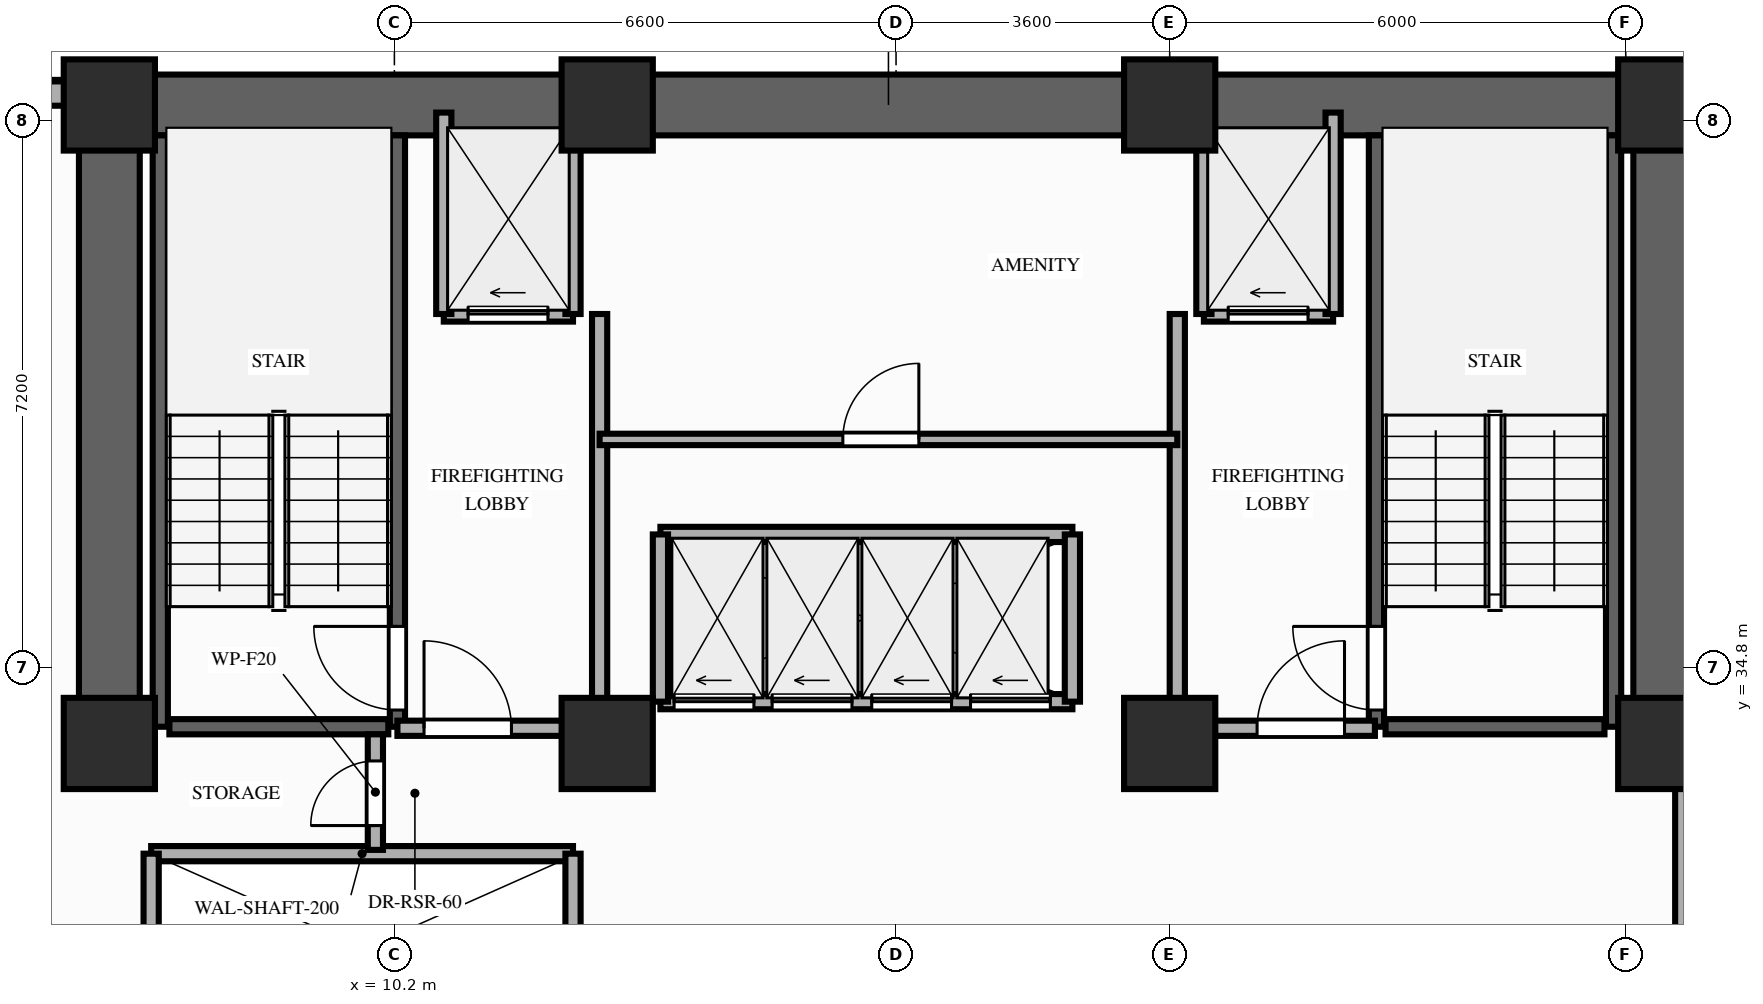
"""IFC4 building model, lengths in metres.
Left out: names, types, materials, properties, quantities, classifications, styles, units other than length and angle.
Written with IfcOpenShell. Run it as: python <this file> out.ifc"""

import sys

from ifc_helpers import new_model, si_unit, direction, frame, frame_2d, origin, origin_2d, place, context, subcontext, project, spatial, rectangle, extrude, element, fill, save


model = new_model("IFC4")
c1 = context("Model", 3, precision=1e-05, world=origin(), true_north=direction((0.0, 1.0)))
c2 = subcontext(c1, "Body", "Model", "MODEL_VIEW")
j1 = project(units=[si_unit("LENGTHUNIT", "METRE"), si_unit("PLANEANGLEUNIT", "RADIAN")], contexts=[c1])
p1 = place(None, origin())
s1 = spatial("IfcSite", under=j1, at=p1, CompositionType="ELEMENT")
p2 = place(p1, origin())
s2 = spatial("IfcBuilding", under=s1, at=p2, CompositionType="ELEMENT")
p3 = place(p2, frame((0.0, 0.0, 86.6)))
s3 = spatial("IfcBuildingStorey", under=s2, at=p3, CompositionType="ELEMENT", Elevation=86.6)
for number, where, z_axis, x_axis in (
    (1, (6.45, 33.8, 0.0), (0.0, 0.0, 1.0), (1.0, 0.0, 0.0)),
    (2, (13.0, 33.8, 0.0), (0.0, 0.0, 1.0), (1.0, 0.0, 0.0)),
    (3, (20.4, 33.8, 0.0), (0.0, 0.0, 1.0), (1.0, 0.0, 0.0)),
    (4, (26.9, 33.8, 0.0), (0.0, 0.0, 1.0), (1.0, 0.0, 0.0)),
    (5, (6.45, 42.2, 0.0), (0.0, 0.0, 1.0), (1.0, 0.0, 0.0)),
    (6, (13.0, 42.2, 0.0), (0.0, 0.0, 1.0), (1.0, 0.0, 0.0)),
    (7, (20.4, 42.2, 0.0), (0.0, 0.0, 1.0), (1.0, 0.0, 0.0)),
    (8, (26.9, 42.2, 0.0), (0.0, 0.0, 1.0), (1.0, 0.0, 0.0)),
):
    element("IfcColumn", number, at=place(p3, frame(where, z_axis=z_axis, x_axis=x_axis)), inside=s3, PredefinedType="COLUMN", context=c2, shape_type="SweptSolid", body=[
        extrude(rectangle(XDim=1.2, YDim=1.2, at=origin_2d()), origin(), (0.0, 0.0, 1.0), 3.2),
    ])
p4 = place(p3, frame((6.0, 42.35, 0.0), z_axis=(0.0, 0.0, 1.0), x_axis=(-1.0, 0.0, 0.0)))
e9 = element("IfcWall", 9, at=p4, inside=s3, PredefinedType="STANDARD", context=c2, shape_type="SweptSolid", body=[
    extrude(rectangle(XDim=2.0, YDim=0.32, at=frame_2d((1.0, 0.0))), origin(), (0.0, 0.0, 1.0), 3.02),
])
p5 = place(p3, frame((6.45, 42.2, 0.0), z_axis=(0.0, 0.0, 1.0), x_axis=(1.0, 0.0, 0.0)))
e10 = element("IfcWall", 10, at=p5, inside=s3, PredefinedType="SHEAR", context=c2, shape_type="SweptSolid", body=[
    extrude(rectangle(XDim=20.45, YDim=0.8, at=frame_2d((10.225, 0.0))), origin(), (0.0, 0.0, 1.0), 3.02),
])
for number, where, z_axis, x_axis in (
    (11, (6.45, 33.8, 0.0), (0.0, 0.0, 1.0), (0.0, 1.0, 0.0)),
    (12, (26.9, 33.8, 0.0), (0.0, 0.0, 1.0), (0.0, 1.0, 0.0)),
):
    element("IfcWall", number, at=place(p3, frame(where, z_axis=z_axis, x_axis=x_axis)), inside=s3, PredefinedType="SHEAR", context=c2, shape_type="SweptSolid", body=[
        extrude(rectangle(XDim=7.95, YDim=0.8, at=frame_2d((3.975, 0.0))), origin(), (0.0, 0.0, 1.0), 3.02),
    ])
p6 = place(p3, frame((7.12, 34.02, 0.0), z_axis=(0.0, 0.0, 1.0), x_axis=(0.0, 1.0, 0.0)))
e13 = element("IfcWall", 13, at=p6, inside=s3, PredefinedType="SHEAR", context=c2, shape_type="SweptSolid", body=[
    extrude(rectangle(XDim=7.78, YDim=0.2, at=frame_2d((3.89, 0.0))), origin(), (0.0, 0.0, 1.0), 3.02),
])
p7 = place(p3, frame((10.24, 34.02, 0.0), z_axis=(0.0, 0.0, 1.0), x_axis=(0.0, 1.0, 0.0)))
e14 = element("IfcWall", 14, at=p7, inside=s3, PredefinedType="SHEAR", context=c2, shape_type="SweptSolid", body=[
    extrude(rectangle(XDim=7.78, YDim=0.2, at=frame_2d((3.89, 0.0))), origin(), (0.0, 0.0, 1.0), 3.02),
])
p8 = place(p7, frame((0.22, 0.0, 0.0)))
e15 = element("IfcOpeningElement", 15, at=p8, cuts=e14, PredefinedType="OPENING", context=c2, shape_type="SweptSolid", body=[
    extrude(rectangle(XDim=1.1, YDim=2.15, at=frame_2d((0.55, 1.075))), frame((0.0, 0.11, 0.0), z_axis=(0.0, -1.0, 0.0), x_axis=(1.0, 0.0, 0.0)), (0.0, 0.0, 1.0), 0.22),
])
p9 = place(p3, frame((7.24, 34.02, 0.0), z_axis=(0.0, 0.0, 1.0), x_axis=(1.0, 0.0, 0.0)))
e16 = element("IfcWall", 16, at=p9, inside=s3, PredefinedType="SHEAR", context=c2, shape_type="SweptSolid", body=[
    extrude(rectangle(XDim=2.88, YDim=0.2, at=frame_2d((1.44, 0.0))), origin(), (0.0, 0.0, 1.0), 3.02),
])
p10 = place(p3, frame((23.12, 34.02, 0.0), z_axis=(0.0, 0.0, 1.0), x_axis=(0.0, 1.0, 0.0)))
e17 = element("IfcWall", 17, at=p10, inside=s3, PredefinedType="SHEAR", context=c2, shape_type="SweptSolid", body=[
    extrude(rectangle(XDim=7.78, YDim=0.2, at=frame_2d((3.89, 0.0))), origin(), (0.0, 0.0, 1.0), 3.02),
])
p11 = place(p10, frame((0.22, 0.0, 0.0)))
e18 = element("IfcOpeningElement", 18, at=p11, cuts=e17, PredefinedType="OPENING", context=c2, shape_type="SweptSolid", body=[
    extrude(rectangle(XDim=1.1, YDim=2.15, at=frame_2d((0.55, 1.075))), frame((0.0, 0.11, 0.0), z_axis=(0.0, -1.0, 0.0), x_axis=(1.0, 0.0, 0.0)), (0.0, 0.0, 1.0), 0.22),
])
p12 = place(p3, frame((26.24, 34.02, 0.0), z_axis=(0.0, 0.0, 1.0), x_axis=(0.0, 1.0, 0.0)))
e19 = element("IfcWall", 19, at=p12, inside=s3, PredefinedType="SHEAR", context=c2, shape_type="SweptSolid", body=[
    extrude(rectangle(XDim=7.78, YDim=0.2, at=frame_2d((3.89, 0.0))), origin(), (0.0, 0.0, 1.0), 3.02),
])
p13 = place(p3, frame((23.24, 34.02, 0.0), z_axis=(0.0, 0.0, 1.0), x_axis=(1.0, 0.0, 0.0)))
e20 = element("IfcWall", 20, at=p13, inside=s3, PredefinedType="SHEAR", context=c2, shape_type="SweptSolid", body=[
    extrude(rectangle(XDim=2.88, YDim=0.2, at=frame_2d((1.44, 0.0))), origin(), (0.0, 0.0, 1.0), 3.02),
])
p14 = place(p3, frame((7.0, 32.35, 0.0), z_axis=(0.0, 0.0, 1.0), x_axis=(1.0, 0.0, 0.0)))
e21 = element("IfcWall", 21, at=p14, inside=s3, PredefinedType="MOVABLE", context=c2, shape_type="SweptSolid", body=[
    extrude(rectangle(XDim=5.55, YDim=0.2, at=frame_2d((2.775, 0.0))), origin(), (0.0, 0.0, 1.0), 3.02),
])
for number, where, z_axis, x_axis in (
    (22, (7.0, 29.85, 0.0), (0.0, 0.0, 1.0), (0.0, 1.0, 0.0)),
    (23, (12.55, 29.85, 0.0), (0.0, 0.0, 1.0), (0.0, 1.0, 0.0)),
):
    element("IfcWall", number, at=place(p3, frame(where, z_axis=z_axis, x_axis=x_axis)), inside=s3, PredefinedType="MOVABLE", context=c2, shape_type="SweptSolid", body=[
        extrude(rectangle(XDim=2.5, YDim=0.2, at=frame_2d((1.25, 0.0))), origin(), (0.0, 0.0, 1.0), 3.02),
    ])
p15 = place(p3, frame((10.85, 39.45, 0.0), z_axis=(0.0, 0.0, 1.0), x_axis=(1.0, 0.0, 0.0)))
e24 = element("IfcWall", 24, at=p15, inside=s3, PredefinedType="MOVABLE", context=c2, shape_type="SweptSolid", body=[
    extrude(rectangle(XDim=1.7, YDim=0.2, at=frame_2d((0.85, 0.0))), origin(), (0.0, 0.0, 1.0), 3.02),
])
p16 = place(p15, frame((0.32, 0.0, 0.0)))
e25 = element("IfcOpeningElement", 25, at=p16, cuts=e24, PredefinedType="OPENING", context=c2, shape_type="SweptSolid", body=[
    extrude(rectangle(XDim=1.05, YDim=2.15, at=frame_2d((0.525, 1.075))), frame((0.0, 0.11, 0.0), z_axis=(0.0, -1.0, 0.0), x_axis=(1.0, 0.0, 0.0)), (0.0, 0.0, 1.0), 0.22),
])
p17 = place(p3, frame((20.85, 39.45, 0.0), z_axis=(0.0, 0.0, 1.0), x_axis=(1.0, 0.0, 0.0)))
e26 = element("IfcWall", 26, at=p17, inside=s3, PredefinedType="MOVABLE", context=c2, shape_type="SweptSolid", body=[
    extrude(rectangle(XDim=1.7, YDim=0.2, at=frame_2d((0.85, 0.0))), origin(), (0.0, 0.0, 1.0), 3.02),
])
p18 = place(p17, frame((0.32, 0.0, 0.0)))
e27 = element("IfcOpeningElement", 27, at=p18, cuts=e26, PredefinedType="OPENING", context=c2, shape_type="SweptSolid", body=[
    extrude(rectangle(XDim=1.05, YDim=2.15, at=frame_2d((0.525, 1.075))), frame((0.0, 0.11, 0.0), z_axis=(0.0, -1.0, 0.0), x_axis=(1.0, 0.0, 0.0)), (0.0, 0.0, 1.0), 0.22),
])
for number, where, z_axis, x_axis in (
    (28, (10.85, 39.45, 0.0), (0.0, 0.0, 1.0), (0.0, 1.0, 0.0)),
    (29, (12.55, 39.45, 0.0), (0.0, 0.0, 1.0), (0.0, 1.0, 0.0)),
):
    element("IfcWall", number, at=place(p3, frame(where, z_axis=z_axis, x_axis=x_axis)), inside=s3, PredefinedType="MOVABLE", context=c2, shape_type="SweptSolid", body=[
        extrude(rectangle(XDim=2.65, YDim=0.2, at=frame_2d((1.325, 0.0))), origin(), (0.0, 0.0, 1.0), 2.4),
    ])
p19 = place(p3, frame((12.9, 34.0, 0.0), z_axis=(0.0, 0.0, 1.0), x_axis=(0.0, 1.0, 0.0)))
e30 = element("IfcWall", 30, at=p19, inside=s3, PredefinedType="PARTITIONING", context=c2, shape_type="SweptSolid", body=[
    extrude(rectangle(XDim=5.45, YDim=0.2, at=frame_2d((2.725, 0.0))), origin(), (0.0, 0.0, 1.0), 2.4),
])
p20 = place(p3, frame((10.24, 34.0, 0.0), z_axis=(0.0, 0.0, 1.0), x_axis=(1.0, 0.0, 0.0)))
e31 = element("IfcWall", 31, at=p20, inside=s3, PredefinedType="PARTITIONING", context=c2, shape_type="SweptSolid", body=[
    extrude(rectangle(XDim=2.66, YDim=0.2, at=frame_2d((1.33, 0.0))), origin(), (0.0, 0.0, 1.0), 2.4),
])
p21 = place(p20, frame((0.35, 0.0, 0.0)))
e32 = element("IfcOpeningElement", 32, at=p21, cuts=e31, PredefinedType="OPENING", context=c2, shape_type="SweptSolid", body=[
    extrude(rectangle(XDim=1.15, YDim=2.15, at=frame_2d((0.575, 1.075))), frame((0.0, 0.11, 0.0), z_axis=(0.0, -1.0, 0.0), x_axis=(1.0, 0.0, 0.0)), (0.0, 0.0, 1.0), 0.22),
])
for number, where, z_axis, x_axis in (
    (33, (20.85, 39.45, 0.0), (0.0, 0.0, 1.0), (0.0, 1.0, 0.0)),
    (34, (22.55, 39.45, 0.0), (0.0, 0.0, 1.0), (0.0, 1.0, 0.0)),
):
    element("IfcWall", number, at=place(p3, frame(where, z_axis=z_axis, x_axis=x_axis)), inside=s3, PredefinedType="MOVABLE", context=c2, shape_type="SweptSolid", body=[
        extrude(rectangle(XDim=2.65, YDim=0.2, at=frame_2d((1.325, 0.0))), origin(), (0.0, 0.0, 1.0), 2.4),
    ])
p22 = place(p3, frame((20.5, 34.0, 0.0), z_axis=(0.0, 0.0, 1.0), x_axis=(0.0, 1.0, 0.0)))
e35 = element("IfcWall", 35, at=p22, inside=s3, PredefinedType="PARTITIONING", context=c2, shape_type="SweptSolid", body=[
    extrude(rectangle(XDim=5.45, YDim=0.2, at=frame_2d((2.725, 0.0))), origin(), (0.0, 0.0, 1.0), 2.4),
])
p23 = place(p3, frame((20.5, 34.0, 0.0), z_axis=(0.0, 0.0, 1.0), x_axis=(1.0, 0.0, 0.0)))
e36 = element("IfcWall", 36, at=p23, inside=s3, PredefinedType="PARTITIONING", context=c2, shape_type="SweptSolid", body=[
    extrude(rectangle(XDim=2.6, YDim=0.2, at=frame_2d((1.3, 0.0))), origin(), (0.0, 0.0, 1.0), 2.4),
])
p24 = place(p23, frame((1.05, 0.0, 0.0)))
e37 = element("IfcOpeningElement", 37, at=p24, cuts=e36, PredefinedType="OPENING", context=c2, shape_type="SweptSolid", body=[
    extrude(rectangle(XDim=1.15, YDim=2.15, at=frame_2d((0.575, 1.075))), frame((0.0, 0.11, 0.0), z_axis=(0.0, -1.0, 0.0), x_axis=(1.0, 0.0, 0.0)), (0.0, 0.0, 1.0), 0.22),
])
p25 = place(p3, frame((9.95, 32.4, 0.0), z_axis=(0.0, 0.0, 1.0), x_axis=(0.0, 1.0, 0.0)))
e38 = element("IfcWall", 38, at=p25, inside=s3, PredefinedType="PARTITIONING", context=c2, shape_type="SweptSolid", body=[
    extrude(rectangle(XDim=1.52, YDim=0.2, at=frame_2d((0.76, 0.0))), origin(), (0.0, 0.0, 1.0), 2.4),
])
p26 = place(p25, frame((0.32, 0.0, 0.0)))
e39 = element("IfcOpeningElement", 39, at=p26, cuts=e38, PredefinedType="OPENING", context=c2, shape_type="SweptSolid", body=[
    extrude(rectangle(XDim=0.85, YDim=2.05, at=frame_2d((0.425, 1.025))), frame((0.0, 0.11, 0.0), z_axis=(0.0, -1.0, 0.0), x_axis=(1.0, 0.0, 0.0)), (0.0, 0.0, 1.0), 0.22),
])
p27 = place(p3, frame((12.9, 37.8, 0.0), z_axis=(0.0, 0.0, 1.0), x_axis=(1.0, 0.0, 0.0)))
e40 = element("IfcWall", 40, at=p27, inside=s3, PredefinedType="PARTITIONING", context=c2, shape_type="SweptSolid", body=[
    extrude(rectangle(XDim=7.6, YDim=0.15, at=frame_2d((3.8, 0.0))), origin(), (0.0, 0.0, 1.0), 3.02),
])
p28 = place(p27, frame((3.2, 0.0, 0.0)))
e41 = element("IfcOpeningElement", 41, at=p28, cuts=e40, PredefinedType="OPENING", context=c2, shape_type="SweptSolid", body=[
    extrude(rectangle(XDim=1.0, YDim=2.15, at=frame_2d((0.5, 1.075))), frame((0.0, 0.085, 0.0), z_axis=(0.0, -1.0, 0.0), x_axis=(1.0, 0.0, 0.0)), (0.0, 0.0, 1.0), 0.17),
])
p29 = place(p3, frame((13.7, 34.35, 0.0), z_axis=(0.0, 0.0, 1.0), x_axis=(1.0, 0.0, 0.0)))
e42 = element("IfcWall", 42, at=p29, inside=s3, PredefinedType="MOVABLE", context=c2, shape_type="SweptSolid", body=[
    extrude(rectangle(XDim=5.42, YDim=0.2, at=frame_2d((2.71, 0.0))), origin(), (0.0, 0.0, 1.0), 3.02),
])
p30 = place(p29, frame((0.18, 0.0, 0.0)))
e43 = element("IfcOpeningElement", 43, at=p30, cuts=e42, PredefinedType="OPENING", context=c2, shape_type="SweptSolid", body=[
    extrude(rectangle(XDim=1.05, YDim=2.15, at=frame_2d((0.525, 1.075))), frame((0.0, 0.11, 0.0), z_axis=(0.0, -1.0, 0.0), x_axis=(1.0, 0.0, 0.0)), (0.0, 0.0, 1.0), 0.22),
])
p31 = place(p29, frame((1.47, 0.0, 0.0)))
e44 = element("IfcOpeningElement", 44, at=p31, cuts=e42, PredefinedType="OPENING", context=c2, shape_type="SweptSolid", body=[
    extrude(rectangle(XDim=1.05, YDim=2.15, at=frame_2d((0.525, 1.075))), frame((0.0, 0.11, 0.0), z_axis=(0.0, -1.0, 0.0), x_axis=(1.0, 0.0, 0.0)), (0.0, 0.0, 1.0), 0.22),
])
p32 = place(p29, frame((2.78, 0.0, 0.0)))
e45 = element("IfcOpeningElement", 45, at=p32, cuts=e42, PredefinedType="OPENING", context=c2, shape_type="SweptSolid", body=[
    extrude(rectangle(XDim=1.05, YDim=2.15, at=frame_2d((0.525, 1.075))), frame((0.0, 0.11, 0.0), z_axis=(0.0, -1.0, 0.0), x_axis=(1.0, 0.0, 0.0)), (0.0, 0.0, 1.0), 0.22),
])
p33 = place(p29, frame((4.08, 0.0, 0.0)))
e46 = element("IfcOpeningElement", 46, at=p33, cuts=e42, PredefinedType="OPENING", context=c2, shape_type="SweptSolid", body=[
    extrude(rectangle(XDim=1.05, YDim=2.15, at=frame_2d((0.525, 1.075))), frame((0.0, 0.11, 0.0), z_axis=(0.0, -1.0, 0.0), x_axis=(1.0, 0.0, 0.0)), (0.0, 0.0, 1.0), 0.22),
])
p34 = place(p3, frame((13.7, 36.55, 0.0), z_axis=(0.0, 0.0, 1.0), x_axis=(1.0, 0.0, 0.0)))
e47 = element("IfcWall", 47, at=p34, inside=s3, PredefinedType="MOVABLE", context=c2, shape_type="SweptSolid", body=[
    extrude(rectangle(XDim=5.42, YDim=0.2, at=frame_2d((2.71, 0.0))), origin(), (0.0, 0.0, 1.0), 3.02),
])
for number, where, z_axis, x_axis in (
    (48, (13.7, 34.35, 0.0), (0.0, 0.0, 1.0), (0.0, 1.0, 0.0)),
    (49, (19.12, 34.35, 0.0), (0.0, 0.0, 1.0), (0.0, 1.0, 0.0)),
):
    element("IfcWall", number, at=place(p3, frame(where, z_axis=z_axis, x_axis=x_axis)), inside=s3, PredefinedType="MOVABLE", context=c2, shape_type="SweptSolid", body=[
        extrude(rectangle(XDim=2.2, YDim=0.2, at=frame_2d((1.1, 0.0))), origin(), (0.0, 0.0, 1.0), 3.02),
    ])
p35 = place(p3, frame((27.15, 31.2, 0.0), z_axis=(0.0, 0.0, 1.0), x_axis=(0.0, 1.0, 0.0)))
e50 = element("IfcWall", 50, at=p35, inside=s3, PredefinedType="PARTITIONING", context=c2, shape_type="SweptSolid", body=[
    extrude(rectangle(XDim=2.48, YDim=0.2, at=frame_2d((1.24, 0.0))), origin(), (0.0, 0.0, 1.0), 2.4),
])
p36 = place(p8, origin())
e51 = element("IfcDoor", 51, at=p36, inside=s3, OperationType="SINGLE_SWING_RIGHT", PredefinedType="DOOR", context=c2, shape_type="SweptSolid", body=[
    extrude(rectangle(XDim=1.1, YDim=2.15, at=frame_2d((0.55, 1.075))), frame((0.0, 0.025, 0.0), z_axis=(0.0, -1.0, 0.0), x_axis=(1.0, 0.0, 0.0)), (0.0, 0.0, 1.0), 0.05),
])
fill(e15, e51)
p37 = place(p11, origin())
e52 = element("IfcDoor", 52, at=p37, inside=s3, OperationType="SINGLE_SWING_RIGHT", PredefinedType="DOOR", context=c2, shape_type="SweptSolid", body=[
    extrude(rectangle(XDim=1.1, YDim=2.15, at=frame_2d((0.55, 1.075))), frame((0.0, 0.025, 0.0), z_axis=(0.0, -1.0, 0.0), x_axis=(1.0, 0.0, 0.0)), (0.0, 0.0, 1.0), 0.05),
])
fill(e18, e52)
p38 = place(p16, origin())
e53 = element("IfcDoor", 53, at=p38, inside=s3, OperationType="SLIDING_TO_LEFT", PredefinedType="DOOR", context=c2, shape_type="SweptSolid", body=[
    extrude(rectangle(XDim=1.05, YDim=2.15, at=frame_2d((0.525, 1.075))), frame((0.0, 0.025, 0.0), z_axis=(0.0, -1.0, 0.0), x_axis=(1.0, 0.0, 0.0)), (0.0, 0.0, 1.0), 0.05),
])
fill(e25, e53)
p39 = place(p18, origin())
e54 = element("IfcDoor", 54, at=p39, inside=s3, OperationType="SLIDING_TO_LEFT", PredefinedType="DOOR", context=c2, shape_type="SweptSolid", body=[
    extrude(rectangle(XDim=1.05, YDim=2.15, at=frame_2d((0.525, 1.075))), frame((0.0, 0.025, 0.0), z_axis=(0.0, -1.0, 0.0), x_axis=(1.0, 0.0, 0.0)), (0.0, 0.0, 1.0), 0.05),
])
fill(e27, e54)
p40 = place(p21, origin())
e55 = element("IfcDoor", 55, at=p40, inside=s3, OperationType="SINGLE_SWING_LEFT", PredefinedType="DOOR", context=c2, shape_type="SweptSolid", body=[
    extrude(rectangle(XDim=1.15, YDim=2.15, at=frame_2d((0.575, 1.075))), frame((0.0, 0.025, 0.0), z_axis=(0.0, -1.0, 0.0), x_axis=(1.0, 0.0, 0.0)), (0.0, 0.0, 1.0), 0.05),
])
fill(e32, e55)
p41 = place(p24, origin())
e56 = element("IfcDoor", 56, at=p41, inside=s3, OperationType="SINGLE_SWING_RIGHT", PredefinedType="DOOR", context=c2, shape_type="SweptSolid", body=[
    extrude(rectangle(XDim=1.15, YDim=2.15, at=frame_2d((0.575, 1.075))), frame((0.0, 0.025, 0.0), z_axis=(0.0, -1.0, 0.0), x_axis=(1.0, 0.0, 0.0)), (0.0, 0.0, 1.0), 0.05),
])
fill(e37, e56)
p42 = place(p26, origin())
e57 = element("IfcDoor", 57, at=p42, inside=s3, OperationType="SINGLE_SWING_LEFT", PredefinedType="DOOR", context=c2, shape_type="SweptSolid", body=[
    extrude(rectangle(XDim=0.85, YDim=2.05, at=frame_2d((0.425, 1.025))), frame((0.0, 0.025, 0.0), z_axis=(0.0, -1.0, 0.0), x_axis=(1.0, 0.0, 0.0)), (0.0, 0.0, 1.0), 0.05),
])
fill(e39, e57)
p43 = place(p28, origin())
e58 = element("IfcDoor", 58, at=p43, inside=s3, OperationType="SINGLE_SWING_RIGHT", PredefinedType="DOOR", context=c2, shape_type="SweptSolid", body=[
    extrude(rectangle(XDim=1.0, YDim=2.15, at=frame_2d((0.5, 1.075))), frame((0.0, 0.025, 0.0), z_axis=(0.0, -1.0, 0.0), x_axis=(1.0, 0.0, 0.0)), (0.0, 0.0, 1.0), 0.05),
])
fill(e41, e58)
p44 = place(p30, origin())
e59 = element("IfcDoor", 59, at=p44, inside=s3, OperationType="SLIDING_TO_LEFT", PredefinedType="DOOR", context=c2, shape_type="SweptSolid", body=[
    extrude(rectangle(XDim=1.05, YDim=2.15, at=frame_2d((0.525, 1.075))), frame((0.0, 0.025, 0.0), z_axis=(0.0, -1.0, 0.0), x_axis=(1.0, 0.0, 0.0)), (0.0, 0.0, 1.0), 0.05),
])
fill(e43, e59)
p45 = place(p31, origin())
e60 = element("IfcDoor", 60, at=p45, inside=s3, OperationType="SLIDING_TO_LEFT", PredefinedType="DOOR", context=c2, shape_type="SweptSolid", body=[
    extrude(rectangle(XDim=1.05, YDim=2.15, at=frame_2d((0.525, 1.075))), frame((0.0, 0.025, 0.0), z_axis=(0.0, -1.0, 0.0), x_axis=(1.0, 0.0, 0.0)), (0.0, 0.0, 1.0), 0.05),
])
fill(e44, e60)
p46 = place(p32, origin())
e61 = element("IfcDoor", 61, at=p46, inside=s3, OperationType="SLIDING_TO_LEFT", PredefinedType="DOOR", context=c2, shape_type="SweptSolid", body=[
    extrude(rectangle(XDim=1.05, YDim=2.15, at=frame_2d((0.525, 1.075))), frame((0.0, 0.025, 0.0), z_axis=(0.0, -1.0, 0.0), x_axis=(1.0, 0.0, 0.0)), (0.0, 0.0, 1.0), 0.05),
])
fill(e45, e61)
p47 = place(p33, origin())
e62 = element("IfcDoor", 62, at=p47, inside=s3, OperationType="SLIDING_TO_LEFT", PredefinedType="DOOR", context=c2, shape_type="SweptSolid", body=[
    extrude(rectangle(XDim=1.05, YDim=2.15, at=frame_2d((0.525, 1.075))), frame((0.0, 0.025, 0.0), z_axis=(0.0, -1.0, 0.0), x_axis=(1.0, 0.0, 0.0)), (0.0, 0.0, 1.0), 0.05),
])
fill(e46, e62)
save(model, sys.argv[1])
